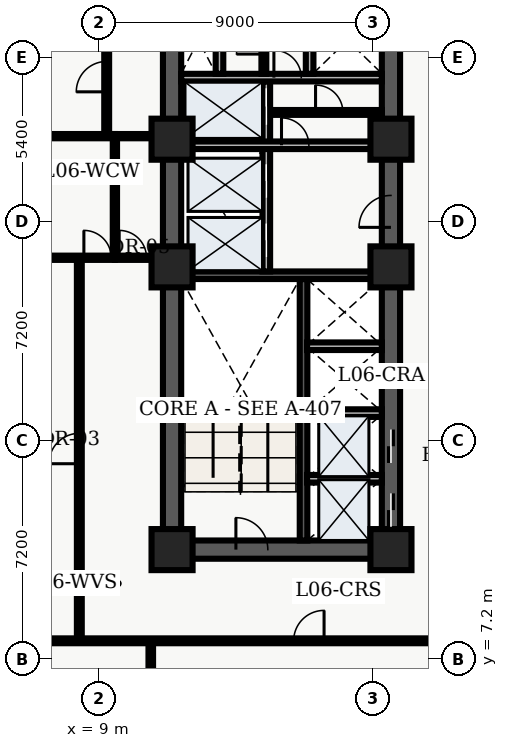
"""IFC4 building model, lengths in metres.
Left out: names, types, materials, properties, quantities, classifications, styles, units other than length and angle.
Written with IfcOpenShell. Run it as: python <this file> out.ifc"""

import sys

from ifc_helpers import new_model, entity, si_unit, converted_unit, direction, frame, origin_with_axes, origin_2d_with_axis, place, context, subcontext, project, spatial, polyline, rectangle, outline, extrude, element, fill, save


model = new_model("IFC4")
c1 = context("Model", 3, precision=1e-05, world=origin_with_axes(), true_north=direction((0.0, 1.0)))
c2 = subcontext(c1, "Body", "Model", "MODEL_VIEW")
j1 = project(units=[si_unit("LENGTHUNIT", "METRE"), converted_unit("PLANEANGLEUNIT", "DEGREE", entity("IfcPlaneAngleMeasure", 0.017), si_unit("PLANEANGLEUNIT", "RADIAN"), dimensions=[0, 0, 0, 0, 0, 0, 0])], contexts=[c1])
p1 = place(None, origin_with_axes())
s1 = spatial("IfcSite", under=j1, at=p1, CompositionType="ELEMENT")
p2 = place(p1, origin_with_axes())
s2 = spatial("IfcBuilding", under=s1, at=p2, CompositionType="ELEMENT")
p3 = place(p2, frame((0.0, 0.0, 28.8), z_axis=(0.0, 0.0, 1.0), x_axis=(1.0, 0.0, 0.0)))
s3 = spatial("IfcBuildingStorey", under=s2, at=p3, CompositionType="ELEMENT", Elevation=28.8)
p4 = place(p3, frame((11.4, 10.8, 0.0), z_axis=(0.0, 0.0, 1.0), x_axis=(0.0, 1.0, 0.0)))
e1 = element("IfcWall", 1, at=p4, inside=s3, PredefinedType="SHEAR", context=c2, shape_type="SweptSolid", body=[
    extrude(outline(polyline([(0.0, -0.3), (27.0, -0.3), (27.0, 0.3), (0.0, 0.3), (0.0, -0.3)])), origin_with_axes(), (0.0, 0.0, 1.0), 3.66),
])
p5 = place(p3, frame((11.4, 10.8, 0.0), z_axis=(0.0, 0.0, 1.0), x_axis=(1.0, 0.0, 0.0)))
e2 = element("IfcWall", 2, at=p5, inside=s3, PredefinedType="SHEAR", context=c2, shape_type="SweptSolid", body=[
    extrude(outline(polyline([(0.0, -0.3), (7.2, -0.3), (7.2, 0.3), (0.0, 0.3), (0.0, -0.3)])), origin_with_axes(), (0.0, 0.0, 1.0), 3.66),
])
p6 = place(p5, frame((2.625, 0.0, 0.0), z_axis=(0.0, 0.0, 1.0), x_axis=(1.0, 0.0, 0.0)))
e3 = element("IfcOpeningElement", 3, at=p6, cuts=e2, PredefinedType="OPENING", context=c2, shape_type="SweptSolid", body=[
    extrude(rectangle(XDim=1.05, YDim=0.62, at=origin_2d_with_axis()), origin_with_axes(), (0.0, 0.0, 1.0), 2.15),
])
p7 = place(p3, frame((18.6, 10.8, 0.0), z_axis=(0.0, 0.0, 1.0), x_axis=(0.0, 1.0, 0.0)))
e4 = element("IfcWall", 4, at=p7, inside=s3, PredefinedType="SHEAR", context=c2, shape_type="SweptSolid", body=[
    extrude(outline(polyline([(0.0, -0.3), (13.5, -0.3), (13.5, 0.3), (0.0, 0.3), (0.0, -0.3)])), origin_with_axes(), (0.0, 0.0, 1.0), 3.66),
])
p8 = place(p7, frame((1.3, 0.0, 0.0), z_axis=(0.0, 0.0, 1.0), x_axis=(1.0, 0.0, 0.0)))
e5 = element("IfcOpeningElement", 5, at=p8, cuts=e4, PredefinedType="OPENING", context=c2, shape_type="SweptSolid", body=[
    extrude(rectangle(XDim=1.1, YDim=0.62, at=origin_2d_with_axis()), origin_with_axes(), (0.0, 0.0, 1.0), 2.15),
])
p9 = place(p7, frame((3.4, 0.0, 0.0), z_axis=(0.0, 0.0, 1.0), x_axis=(1.0, 0.0, 0.0)))
e6 = element("IfcOpeningElement", 6, at=p9, cuts=e4, PredefinedType="OPENING", context=c2, shape_type="SweptSolid", body=[
    extrude(rectangle(XDim=1.1, YDim=0.62, at=origin_2d_with_axis()), origin_with_axes(), (0.0, 0.0, 1.0), 2.15),
])
p10 = place(p7, frame((11.125, 0.0, 0.0), z_axis=(0.0, 0.0, 1.0), x_axis=(1.0, 0.0, 0.0)))
e7 = element("IfcOpeningElement", 7, at=p10, cuts=e4, PredefinedType="OPENING", context=c2, shape_type="SweptSolid", body=[
    extrude(rectangle(XDim=1.05, YDim=0.62, at=origin_2d_with_axis()), origin_with_axes(), (0.0, 0.0, 1.0), 2.15),
])
p11 = place(p3, frame((18.6, 24.3, 0.0), z_axis=(0.0, 0.0, 1.0), x_axis=(0.0, 1.0, 0.0)))
e8 = element("IfcWall", 8, at=p11, inside=s3, PredefinedType="SHEAR", context=c2, shape_type="SweptSolid", body=[
    extrude(outline(polyline([(0.0, -0.3), (13.5, -0.3), (13.5, 0.3), (0.0, 0.3), (0.0, -0.3)])), origin_with_axes(), (0.0, 0.0, 1.0), 3.66),
])
p12 = place(p11, frame((6.025, 0.0, 0.0), z_axis=(0.0, 0.0, 1.0), x_axis=(1.0, 0.0, 0.0)))
e9 = element("IfcOpeningElement", 9, at=p12, cuts=e8, PredefinedType="OPENING", context=c2, shape_type="SweptSolid", body=[
    extrude(rectangle(XDim=0.95, YDim=0.62, at=origin_2d_with_axis()), origin_with_axes(), (0.0, 0.0, 1.0), 2.15),
])
p13 = place(p11, frame((7.825, 0.0, 0.0), z_axis=(0.0, 0.0, 1.0), x_axis=(1.0, 0.0, 0.0)))
e10 = element("IfcOpeningElement", 10, at=p13, cuts=e8, PredefinedType="OPENING", context=c2, shape_type="SweptSolid", body=[
    extrude(rectangle(XDim=0.95, YDim=0.62, at=origin_2d_with_axis()), origin_with_axes(), (0.0, 0.0, 1.0), 2.15),
])
p14 = place(p3, frame((15.725, 11.1, 0.0), z_axis=(0.0, 0.0, 1.0), x_axis=(0.0, 1.0, 0.0)))
e11 = element("IfcWall", 11, at=p14, inside=s3, PredefinedType="SHEAR", context=c2, shape_type="SweptSolid", body=[
    extrude(outline(polyline([(0.0, -0.125), (8.6, -0.125), (8.6, 0.125), (0.0, 0.125), (0.0, -0.125)])), origin_with_axes(), (0.0, 0.0, 1.0), 3.66),
])
p15 = place(p3, frame((11.7, 19.825, 0.0), z_axis=(0.0, 0.0, 1.0), x_axis=(1.0, 0.0, 0.0)))
e12 = element("IfcWall", 12, at=p15, inside=s3, PredefinedType="SHEAR", context=c2, shape_type="SweptSolid", body=[
    extrude(outline(polyline([(0.0, -0.125), (6.6, -0.125), (6.6, 0.125), (0.0, 0.125), (0.0, -0.125)])), origin_with_axes(), (0.0, 0.0, 1.0), 3.66),
])
p16 = place(p3, frame((14.5, 19.95, 0.0), z_axis=(0.0, 0.0, 1.0), x_axis=(0.0, 1.0, 0.0)))
e13 = element("IfcWall", 13, at=p16, inside=s3, PredefinedType="SOLIDWALL", context=c2, shape_type="SweptSolid", body=[
    extrude(outline(polyline([(0.0, -0.125), (6.25, -0.125), (6.25, 0.125), (0.0, 0.125), (0.0, -0.125)])), origin_with_axes(), (0.0, 0.0, 1.0), 2.7),
])
p17 = place(p16, frame((1.025, 0.0, 0.0), z_axis=(0.0, 0.0, 1.0), x_axis=(1.0, 0.0, 0.0)))
e14 = element("IfcOpeningElement", 14, at=p17, cuts=e13, PredefinedType="OPENING", context=c2, shape_type="SweptSolid", body=[
    extrude(rectangle(XDim=1.1, YDim=0.27, at=origin_2d_with_axis()), origin_with_axes(), (0.0, 0.0, 1.0), 2.15),
])
p18 = place(p16, frame((2.975, 0.0, 0.0), z_axis=(0.0, 0.0, 1.0), x_axis=(1.0, 0.0, 0.0)))
e15 = element("IfcOpeningElement", 15, at=p18, cuts=e13, PredefinedType="OPENING", context=c2, shape_type="SweptSolid", body=[
    extrude(rectangle(XDim=1.1, YDim=0.27, at=origin_2d_with_axis()), origin_with_axes(), (0.0, 0.0, 1.0), 2.15),
])
p19 = place(p16, frame((5.425, 0.0, 0.0), z_axis=(0.0, 0.0, 1.0), x_axis=(1.0, 0.0, 0.0)))
e16 = element("IfcOpeningElement", 16, at=p19, cuts=e13, PredefinedType="OPENING", context=c2, shape_type="SweptSolid", body=[
    extrude(rectangle(XDim=1.2, YDim=0.27, at=origin_2d_with_axis()), origin_with_axes(), (0.0, 0.0, 1.0), 2.15),
])
p20 = place(p3, frame((11.7, 24.1, 0.0), z_axis=(0.0, 0.0, 1.0), x_axis=(1.0, 0.0, 0.0)))
e17 = element("IfcWall", 17, at=p20, inside=s3, PredefinedType="SOLIDWALL", context=c2, shape_type="SweptSolid", body=[
    extrude(outline(polyline([(0.0, -0.125), (6.6, -0.125), (6.6, 0.125), (0.0, 0.125), (0.0, -0.125)])), origin_with_axes(), (0.0, 0.0, 1.0), 2.7),
])
p21 = place(p20, frame((3.75, 0.0, 0.0), z_axis=(0.0, 0.0, 1.0), x_axis=(1.0, 0.0, 0.0)))
e18 = element("IfcOpeningElement", 18, at=p21, cuts=e17, PredefinedType="OPENING", context=c2, shape_type="SweptSolid", body=[
    extrude(rectangle(XDim=0.9, YDim=0.27, at=origin_2d_with_axis()), origin_with_axes(), (0.0, 0.0, 1.0), 2.15),
])
p22 = place(p3, frame((11.7, 26.325, 0.0), z_axis=(0.0, 0.0, 1.0), x_axis=(1.0, 0.0, 0.0)))
e19 = element("IfcWall", 19, at=p22, inside=s3, PredefinedType="SOLIDWALL", context=c2, shape_type="SweptSolid", body=[
    extrude(outline(polyline([(0.0, -0.125), (6.6, -0.125), (6.6, 0.125), (0.0, 0.125), (0.0, -0.125)])), origin_with_axes(), (0.0, 0.0, 1.0), 2.7),
])
p23 = place(p22, frame((3.5, 0.0, 0.0), z_axis=(0.0, 0.0, 1.0), x_axis=(1.0, 0.0, 0.0)))
e20 = element("IfcOpeningElement", 20, at=p23, cuts=e19, PredefinedType="OPENING", context=c2, shape_type="SweptSolid", body=[
    extrude(rectangle(XDim=0.9, YDim=0.27, at=origin_2d_with_axis()), origin_with_axes(), (0.0, 0.0, 1.0), 2.15),
])
for number, where, z_axis, x_axis in (
    (21, (12.96, 26.45, 0.0), (0.0, 0.0, 1.0), (0.0, 1.0, 0.0)),
    (22, (15.925, 26.45, 0.0), (0.0, 0.0, 1.0), (0.0, 1.0, 0.0)),
):
    element("IfcWall", number, at=place(p3, frame(where, z_axis=z_axis, x_axis=x_axis)), inside=s3, PredefinedType="SOLIDWALL", context=c2, shape_type="SweptSolid", body=[
        extrude(outline(polyline([(0.0, -0.125), (2.2, -0.125), (2.2, 0.125), (0.0, 0.125), (0.0, -0.125)])), origin_with_axes(), (0.0, 0.0, 1.0), 2.7),
    ])
for number, where, z_axis, x_axis in (
    (23, (11.4, 10.8, 0.0), (0.0, 0.0, 1.0), (1.0, 0.0, 0.0)),
    (24, (11.4, 20.1, 0.0), (0.0, 0.0, 1.0), (1.0, 0.0, 0.0)),
    (25, (11.4, 24.3, 0.0), (0.0, 0.0, 1.0), (1.0, 0.0, 0.0)),
    (26, (18.6, 10.8, 0.0), (0.0, 0.0, 1.0), (1.0, 0.0, 0.0)),
    (27, (18.6, 20.1, 0.0), (0.0, 0.0, 1.0), (1.0, 0.0, 0.0)),
    (28, (18.6, 24.3, 0.0), (0.0, 0.0, 1.0), (1.0, 0.0, 0.0)),
):
    element("IfcColumn", number, at=place(p3, frame(where, z_axis=z_axis, x_axis=x_axis)), inside=s3, PredefinedType="COLUMN", context=c2, shape_type="SweptSolid", body=[
        extrude(rectangle(XDim=1.35, YDim=1.35, at=origin_2d_with_axis()), origin_with_axes(), (0.0, 0.0, 1.0), 3.9),
    ])
p24 = place(p3, frame((14.62, 25.18, 0.0), z_axis=(0.0, 0.0, 1.0), x_axis=(1.0, 0.0, 0.0)))
e29 = element("IfcWall", 29, at=p24, inside=s3, PredefinedType="PARTITIONING", context=c2, shape_type="SweptSolid", body=[
    extrude(outline(polyline([(0.0, -0.08), (3.68, -0.08), (3.68, 0.08), (0.0, 0.08), (0.0, -0.08)])), origin_with_axes(), (0.0, 0.0, 1.0), 2.7),
])
p25 = place(p24, frame((1.95, 0.0, 0.0), z_axis=(0.0, 0.0, 1.0), x_axis=(1.0, 0.0, 0.0)))
e30 = element("IfcOpeningElement", 30, at=p25, cuts=e29, PredefinedType="OPENING", context=c2, shape_type="SweptSolid", body=[
    extrude(rectangle(XDim=0.9, YDim=0.18, at=origin_2d_with_axis()), origin_with_axes(), (0.0, 0.0, 1.0), 2.15),
])
p26 = place(p3, frame((14.42, 26.45, 0.0), z_axis=(0.0, 0.0, 1.0), x_axis=(0.0, 1.0, 0.0)))
e31 = element("IfcWall", 31, at=p26, inside=s3, PredefinedType="PARTITIONING", context=c2, shape_type="SweptSolid", body=[
    extrude(outline(polyline([(0.0, -0.08), (2.2, -0.08), (2.2, 0.08), (0.0, 0.08), (0.0, -0.08)])), origin_with_axes(), (0.0, 0.0, 1.0), 2.7),
])
p27 = place(p26, frame((1.1, 0.0, 0.0), z_axis=(0.0, 0.0, 1.0), x_axis=(1.0, 0.0, 0.0)))
e32 = element("IfcOpeningElement", 32, at=p27, cuts=e31, PredefinedType="OPENING", context=c2, shape_type="SweptSolid", body=[
    extrude(rectangle(XDim=0.9, YDim=0.18, at=origin_2d_with_axis()), origin_with_axes(), (0.0, 0.0, 1.0), 2.15),
])
for number, where, z_axis, x_axis in (
    (33, (15.84, 13.13, 0.0), (0.0, 0.0, 1.0), (1.0, 0.0, 0.0)),
    (34, (15.84, 15.29, 0.0), (0.0, 0.0, 1.0), (1.0, 0.0, 0.0)),
    (35, (15.84, 17.49, 0.0), (0.0, 0.0, 1.0), (1.0, 0.0, 0.0)),
):
    element("IfcWall", number, at=place(p3, frame(where, z_axis=z_axis, x_axis=x_axis)), inside=s3, PredefinedType="SOLIDWALL", context=c2, shape_type="SweptSolid", body=[
        extrude(outline(polyline([(0.0, -0.125), (2.46, -0.125), (2.46, 0.125), (0.0, 0.125), (0.0, -0.125)])), origin_with_axes(), (0.0, 0.0, 1.0), 2.7),
    ])
p28 = place(p3, frame((9.52, 20.4, 0.0), z_axis=(0.0, 0.0, 1.0), x_axis=(0.0, 1.0, 0.0)))
e36 = element("IfcWall", 36, at=p28, inside=s3, PredefinedType="PARTITIONING", context=c2, shape_type="SweptSolid", body=[
    extrude(outline(polyline([(0.0, -0.07), (4.0, -0.07), (4.0, 0.07), (0.0, 0.07), (0.0, -0.07)])), origin_with_axes(), (0.0, 0.0, 1.0), 2.7),
])
p29 = place(p3, frame((9.52, 20.4, 0.0), z_axis=(0.0, 0.0, 1.0), x_axis=(1.0, 0.0, 0.0)))
e37 = element("IfcWall", 37, at=p29, inside=s3, PredefinedType="PARTITIONING", context=c2, shape_type="SweptSolid", body=[
    extrude(outline(polyline([(0.0, -0.07), (1.58, -0.07), (1.58, 0.07), (0.0, 0.07), (0.0, -0.07)])), origin_with_axes(), (0.0, 0.0, 1.0), 2.7),
])
p30 = place(p29, frame((0.59, 0.0, 0.0), z_axis=(0.0, 0.0, 1.0), x_axis=(1.0, 0.0, 0.0)))
e38 = element("IfcOpeningElement", 38, at=p30, cuts=e37, PredefinedType="OPENING", context=c2, shape_type="SweptSolid", body=[
    extrude(rectangle(XDim=0.9, YDim=0.16, at=origin_2d_with_axis()), origin_with_axes(), (0.0, 0.0, 1.0), 2.15),
])
p31 = place(p3, frame((9.52, 24.4, 0.0), z_axis=(0.0, 0.0, 1.0), x_axis=(1.0, 0.0, 0.0)))
e39 = element("IfcWall", 39, at=p31, inside=s3, PredefinedType="PARTITIONING", context=c2, shape_type="SweptSolid", body=[
    extrude(outline(polyline([(0.0, -0.07), (1.58, -0.07), (1.58, 0.07), (0.0, 0.07), (0.0, -0.07)])), origin_with_axes(), (0.0, 0.0, 1.0), 2.7),
])
p32 = place(p3, frame((2.6, 7.8, 0.0), z_axis=(0.0, 0.0, 1.0), x_axis=(1.0, 0.0, 0.0)))
e40 = element("IfcWall", 40, at=p32, inside=s3, PredefinedType="PARTITIONING", context=c2, shape_type="SweptSolid", body=[
    extrude(outline(polyline([(0.0, -0.08), (18.55, -0.08), (18.55, 0.08), (0.0, 0.08), (0.0, -0.08)])), origin_with_axes(), (0.0, 0.0, 1.0), 2.7),
])
p33 = place(p32, frame((3.765, 0.0, 0.0), z_axis=(0.0, 0.0, 1.0), x_axis=(1.0, 0.0, 0.0)))
e41 = element("IfcOpeningElement", 41, at=p33, cuts=e40, PredefinedType="OPENING", context=c2, shape_type="SweptSolid", body=[
    extrude(rectangle(XDim=1.0, YDim=0.18, at=origin_2d_with_axis()), origin_with_axes(), (0.0, 0.0, 1.0), 2.15),
])
p34 = place(p32, frame((13.3, 0.0, 0.0), z_axis=(0.0, 0.0, 1.0), x_axis=(1.0, 0.0, 0.0)))
e42 = element("IfcOpeningElement", 42, at=p34, cuts=e40, PredefinedType="OPENING", context=c2, shape_type="SweptSolid", body=[
    extrude(rectangle(XDim=1.0, YDim=0.18, at=origin_2d_with_axis()), origin_with_axes(), (0.0, 0.0, 1.0), 2.15),
])
p35 = place(p3, frame((8.35, 7.8, 0.0), z_axis=(0.0, 0.0, 1.0), x_axis=(0.0, 1.0, 0.0)))
e43 = element("IfcWall", 43, at=p35, inside=s3, PredefinedType="PARTITIONING", context=c2, shape_type="SweptSolid", body=[
    extrude(outline(polyline([(0.0, -0.08), (12.6, -0.08), (12.6, 0.08), (0.0, 0.08), (0.0, -0.08)])), origin_with_axes(), (0.0, 0.0, 1.0), 2.7),
])
p36 = place(p35, frame((6.325, 0.0, 0.0), z_axis=(0.0, 0.0, 1.0), x_axis=(1.0, 0.0, 0.0)))
e44 = element("IfcOpeningElement", 44, at=p36, cuts=e43, PredefinedType="OPENING", context=c2, shape_type="SweptSolid", body=[
    extrude(rectangle(XDim=1.0, YDim=0.18, at=origin_2d_with_axis()), origin_with_axes(), (0.0, 0.0, 1.0), 2.15),
])
p37 = place(p3, frame((9.25, 24.4, 0.0), z_axis=(0.0, 0.0, 1.0), x_axis=(0.0, 1.0, 0.0)))
e45 = element("IfcWall", 45, at=p37, inside=s3, PredefinedType="PARTITIONING", context=c2, shape_type="SweptSolid", body=[
    extrude(outline(polyline([(0.0, -0.08), (16.1, -0.08), (16.1, 0.08), (0.0, 0.08), (0.0, -0.08)])), origin_with_axes(), (0.0, 0.0, 1.0), 2.7),
])
p38 = place(p37, frame((1.958, 0.0, 0.0), z_axis=(0.0, 0.0, 1.0), x_axis=(1.0, 0.0, 0.0)))
e46 = element("IfcOpeningElement", 46, at=p38, cuts=e45, PredefinedType="OPENING", context=c2, shape_type="SweptSolid", body=[
    extrude(rectangle(XDim=1.0, YDim=0.18, at=origin_2d_with_axis()), origin_with_axes(), (0.0, 0.0, 1.0), 2.15),
])
p39 = place(p37, frame((10.992, 0.0, 0.0), z_axis=(0.0, 0.0, 1.0), x_axis=(1.0, 0.0, 0.0)))
e47 = element("IfcOpeningElement", 47, at=p39, cuts=e45, PredefinedType="OPENING", context=c2, shape_type="SweptSolid", body=[
    extrude(rectangle(XDim=1.0, YDim=0.18, at=origin_2d_with_axis()), origin_with_axes(), (0.0, 0.0, 1.0), 2.15),
])
p40 = place(p3, frame((0.36, 20.4, 0.0), z_axis=(0.0, 0.0, 1.0), x_axis=(1.0, 0.0, 0.0)))
e48 = element("IfcWall", 48, at=p40, inside=s3, PredefinedType="PARTITIONING", context=c2, shape_type="SweptSolid", body=[
    extrude(outline(polyline([(0.0, -0.07), (9.16, -0.07), (9.16, 0.07), (0.0, 0.07), (0.0, -0.07)])), origin_with_axes(), (0.0, 0.0, 1.0), 2.7),
])
p41 = place(p40, frame((8.59, 0.0, 0.0), z_axis=(0.0, 0.0, 1.0), x_axis=(1.0, 0.0, 0.0)))
e49 = element("IfcOpeningElement", 49, at=p41, cuts=e48, PredefinedType="OPENING", context=c2, shape_type="SweptSolid", body=[
    extrude(rectangle(XDim=0.9, YDim=0.16, at=origin_2d_with_axis()), origin_with_axes(), (0.0, 0.0, 1.0), 2.15),
])
p42 = place(p3, frame((0.36, 24.4, 0.0), z_axis=(0.0, 0.0, 1.0), x_axis=(1.0, 0.0, 0.0)))
e50 = element("IfcWall", 50, at=p42, inside=s3, PredefinedType="PARTITIONING", context=c2, shape_type="SweptSolid", body=[
    extrude(outline(polyline([(0.0, -0.07), (9.16, -0.07), (9.16, 0.07), (0.0, 0.07), (0.0, -0.07)])), origin_with_axes(), (0.0, 0.0, 1.0), 2.7),
])
p43 = place(p3, frame((10.7, 0.36, 0.0), z_axis=(0.0, 0.0, 1.0), x_axis=(0.0, 1.0, 0.0)))
e51 = element("IfcWall", 51, at=p43, inside=s3, PredefinedType="PARTITIONING", context=c2, shape_type="SweptSolid", body=[
    extrude(outline(polyline([(0.0, -0.075), (7.34, -0.075), (7.34, 0.075), (0.0, 0.075), (0.0, -0.075)])), origin_with_axes(), (0.0, 0.0, 1.0), 2.7),
])
p44 = place(p7, frame((1.3, 0.0, 0.0), z_axis=(0.0, 0.0, 1.0), x_axis=(1.0, 0.0, 0.0)))
e52 = element("IfcDoor", 52, at=p44, inside=s3, OperationType="SLIDING_TO_LEFT", PredefinedType="DOOR", context=c2, shape_type="SweptSolid", body=[
    extrude(rectangle(XDim=1.1, YDim=0.09, at=origin_2d_with_axis()), origin_with_axes(), (0.0, 0.0, 1.0), 2.15),
])
fill(e5, e52)
p45 = place(p7, frame((3.4, 0.0, 0.0), z_axis=(0.0, 0.0, 1.0), x_axis=(1.0, 0.0, 0.0)))
e53 = element("IfcDoor", 53, at=p45, inside=s3, OperationType="SLIDING_TO_RIGHT", PredefinedType="DOOR", context=c2, shape_type="SweptSolid", body=[
    extrude(rectangle(XDim=1.1, YDim=0.09, at=origin_2d_with_axis()), origin_with_axes(), (0.0, 0.0, 1.0), 2.15),
])
fill(e6, e53)
p46 = place(p16, frame((1.025, 0.0, 0.0), z_axis=(0.0, 0.0, 1.0), x_axis=(1.0, 0.0, 0.0)))
e54 = element("IfcDoor", 54, at=p46, inside=s3, OperationType="SLIDING_TO_LEFT", PredefinedType="DOOR", context=c2, shape_type="SweptSolid", body=[
    extrude(rectangle(XDim=1.1, YDim=0.09, at=origin_2d_with_axis()), origin_with_axes(), (0.0, 0.0, 1.0), 2.15),
])
fill(e14, e54)
p47 = place(p16, frame((2.975, 0.0, 0.0), z_axis=(0.0, 0.0, 1.0), x_axis=(1.0, 0.0, 0.0)))
e55 = element("IfcDoor", 55, at=p47, inside=s3, OperationType="SLIDING_TO_RIGHT", PredefinedType="DOOR", context=c2, shape_type="SweptSolid", body=[
    extrude(rectangle(XDim=1.1, YDim=0.09, at=origin_2d_with_axis()), origin_with_axes(), (0.0, 0.0, 1.0), 2.15),
])
fill(e15, e55)
p48 = place(p16, frame((5.425, 0.0, 0.0), z_axis=(0.0, 0.0, 1.0), x_axis=(1.0, 0.0, 0.0)))
e56 = element("IfcDoor", 56, at=p48, inside=s3, OperationType="DOUBLE_DOOR_SLIDING", PredefinedType="DOOR", context=c2, shape_type="SweptSolid", body=[
    extrude(rectangle(XDim=1.2, YDim=0.09, at=origin_2d_with_axis()), origin_with_axes(), (0.0, 0.0, 1.0), 2.15),
])
fill(e16, e56)
p49 = place(p5, frame((2.625, 0.0, 0.0), z_axis=(0.0, 0.0, 1.0), x_axis=(1.0, 0.0, 0.0)))
e57 = element("IfcDoor", 57, at=p49, inside=s3, OperationType="SINGLE_SWING_LEFT", PredefinedType="DOOR", context=c2, shape_type="SweptSolid", body=[
    extrude(rectangle(XDim=1.05, YDim=0.09, at=origin_2d_with_axis()), origin_with_axes(), (0.0, 0.0, 1.0), 2.15),
])
fill(e3, e57)
p50 = place(p7, frame((11.125, 0.0, 0.0), z_axis=(0.0, 0.0, 1.0), x_axis=(1.0, 0.0, 0.0)))
e58 = element("IfcDoor", 58, at=p50, inside=s3, OperationType="SINGLE_SWING_LEFT", PredefinedType="DOOR", context=c2, shape_type="SweptSolid", body=[
    extrude(rectangle(XDim=1.05, YDim=0.09, at=origin_2d_with_axis()), origin_with_axes(), (0.0, 0.0, 1.0), 2.15),
])
fill(e7, e58)
p51 = place(p22, frame((3.5, 0.0, 0.0), z_axis=(0.0, 0.0, 1.0), x_axis=(1.0, 0.0, 0.0)))
e59 = element("IfcDoor", 59, at=p51, inside=s3, OperationType="SINGLE_SWING_LEFT", PredefinedType="DOOR", context=c2, shape_type="SweptSolid", body=[
    extrude(rectangle(XDim=0.9, YDim=0.09, at=origin_2d_with_axis()), origin_with_axes(), (0.0, 0.0, 1.0), 2.15),
])
fill(e20, e59)
p52 = place(p26, frame((1.1, 0.0, 0.0), z_axis=(0.0, 0.0, 1.0), x_axis=(1.0, 0.0, 0.0)))
e60 = element("IfcDoor", 60, at=p52, inside=s3, OperationType="SINGLE_SWING_LEFT", PredefinedType="DOOR", context=c2, shape_type="SweptSolid", body=[
    extrude(rectangle(XDim=0.9, YDim=0.09, at=origin_2d_with_axis()), origin_with_axes(), (0.0, 0.0, 1.0), 2.15),
])
fill(e32, e60)
p53 = place(p20, frame((3.75, 0.0, 0.0), z_axis=(0.0, 0.0, 1.0), x_axis=(1.0, 0.0, 0.0)))
e61 = element("IfcDoor", 61, at=p53, inside=s3, OperationType="SINGLE_SWING_LEFT", PredefinedType="DOOR", context=c2, shape_type="SweptSolid", body=[
    extrude(rectangle(XDim=0.9, YDim=0.09, at=origin_2d_with_axis()), origin_with_axes(), (0.0, 0.0, 1.0), 2.15),
])
fill(e18, e61)
p54 = place(p24, frame((1.95, 0.0, 0.0), z_axis=(0.0, 0.0, 1.0), x_axis=(1.0, 0.0, 0.0)))
e62 = element("IfcDoor", 62, at=p54, inside=s3, OperationType="SINGLE_SWING_LEFT", PredefinedType="DOOR", context=c2, shape_type="SweptSolid", body=[
    extrude(rectangle(XDim=0.9, YDim=0.09, at=origin_2d_with_axis()), origin_with_axes(), (0.0, 0.0, 1.0), 2.15),
])
fill(e30, e62)
p55 = place(p29, frame((0.59, 0.0, 0.0), z_axis=(0.0, 0.0, 1.0), x_axis=(1.0, 0.0, 0.0)))
e63 = element("IfcDoor", 63, at=p55, inside=s3, OperationType="SINGLE_SWING_LEFT", PredefinedType="DOOR", context=c2, shape_type="SweptSolid", body=[
    extrude(rectangle(XDim=0.9, YDim=0.084, at=origin_2d_with_axis()), origin_with_axes(), (0.0, 0.0, 1.0), 2.15),
])
fill(e38, e63)
p56 = place(p40, frame((8.59, 0.0, 0.0), z_axis=(0.0, 0.0, 1.0), x_axis=(1.0, 0.0, 0.0)))
e64 = element("IfcDoor", 64, at=p56, inside=s3, OperationType="SINGLE_SWING_LEFT", PredefinedType="DOOR", context=c2, shape_type="SweptSolid", body=[
    extrude(rectangle(XDim=0.9, YDim=0.084, at=origin_2d_with_axis()), origin_with_axes(), (0.0, 0.0, 1.0), 2.15),
])
fill(e49, e64)
p57 = place(p35, frame((6.325, 0.0, 0.0), z_axis=(0.0, 0.0, 1.0), x_axis=(1.0, 0.0, 0.0)))
e65 = element("IfcDoor", 65, at=p57, inside=s3, OperationType="SINGLE_SWING_LEFT", PredefinedType="DOOR", context=c2, shape_type="SweptSolid", body=[
    extrude(rectangle(XDim=1.0, YDim=0.09, at=origin_2d_with_axis()), origin_with_axes(), (0.0, 0.0, 1.0), 2.15),
])
fill(e44, e65)
p58 = place(p37, frame((1.958, 0.0, 0.0), z_axis=(0.0, 0.0, 1.0), x_axis=(1.0, 0.0, 0.0)))
e66 = element("IfcDoor", 66, at=p58, inside=s3, OperationType="SINGLE_SWING_LEFT", PredefinedType="DOOR", context=c2, shape_type="SweptSolid", body=[
    extrude(rectangle(XDim=1.0, YDim=0.09, at=origin_2d_with_axis()), origin_with_axes(), (0.0, 0.0, 1.0), 2.15),
])
fill(e46, e66)
p59 = place(p32, frame((13.3, 0.0, 0.0), z_axis=(0.0, 0.0, 1.0), x_axis=(1.0, 0.0, 0.0)))
e67 = element("IfcDoor", 67, at=p59, inside=s3, OperationType="SINGLE_SWING_RIGHT", PredefinedType="DOOR", context=c2, shape_type="SweptSolid", body=[
    extrude(rectangle(XDim=1.0, YDim=0.09, at=origin_2d_with_axis()), origin_with_axes(), (0.0, 0.0, 1.0), 2.15),
])
fill(e42, e67)
save(model, sys.argv[1])
